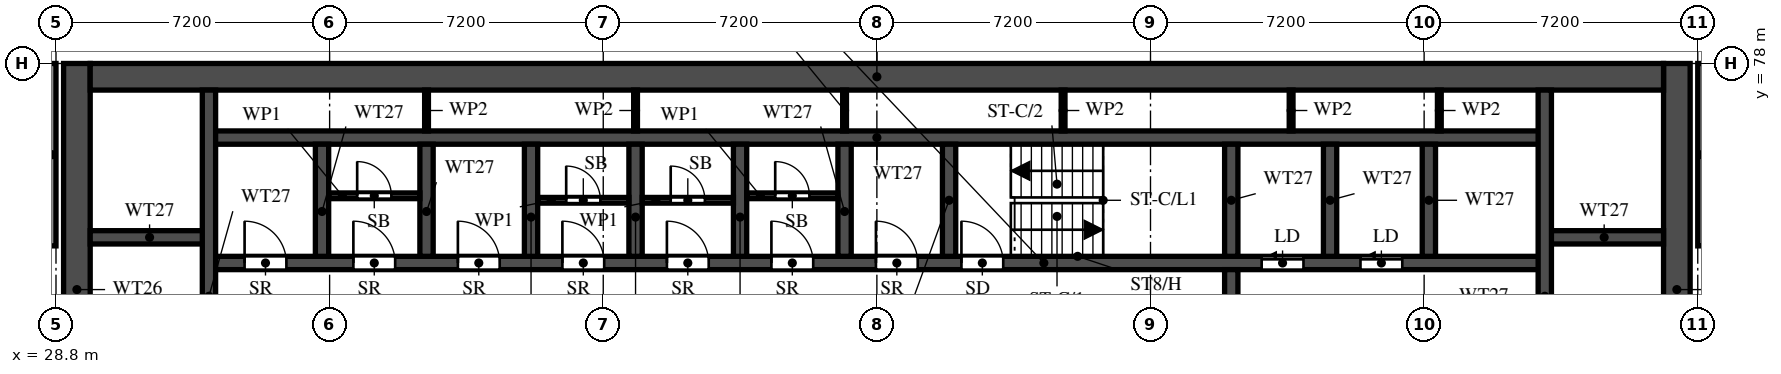
"""IFC4 building model, lengths in metres.
Left out: names, types, materials, properties, quantities, classifications, styles, units other than length and angle.
Written with IfcOpenShell. Run it as: python <this file> out.ifc"""

import sys

from ifc_helpers import new_model, si_unit, direction, frame, frame_2d, origin, place, context, subcontext, project, spatial, rectangle, extrude, element, fill, save


model = new_model("IFC4")
c1 = context("Model", 3, precision=1e-05, world=origin(), true_north=direction((0.0, 1.0)))
c2 = subcontext(c1, "Body", "Model", "MODEL_VIEW")
j1 = project(units=[si_unit("LENGTHUNIT", "METRE"), si_unit("PLANEANGLEUNIT", "RADIAN")], contexts=[c1])
p1 = place(None, origin())
s1 = spatial("IfcSite", under=j1, at=p1, CompositionType="ELEMENT")
p2 = place(p1, origin())
s2 = spatial("IfcBuilding", under=s1, at=p2, CompositionType="ELEMENT")
p3 = place(p2, frame((0.0, 0.0, 120.0)))
s3 = spatial("IfcBuildingStorey", under=s2, at=p3, CompositionType="ELEMENT", Elevation=120.0)
for number, where, z_axis, x_axis in (
    (1, (29.35, 66.1, 0.0), (0.0, 0.0, 1.0), (0.0, 1.0, 0.0)),
    (2, (71.45, 66.1, 0.0), (0.0, 0.0, 1.0), (0.0, 1.0, 0.0)),
):
    element("IfcWall", number, at=place(p3, frame(where, z_axis=z_axis, x_axis=x_axis)), inside=s3, PredefinedType="SHEAR", context=c2, shape_type="SweptSolid", body=[
        extrude(rectangle(XDim=11.9, YDim=0.7, at=frame_2d((5.95, 0.0))), origin(), (0.0, 0.0, 1.0), 3.2),
    ])
p4 = place(p3, frame((29.7, 77.65, 0.0), z_axis=(0.0, 0.0, 1.0), x_axis=(1.0, 0.0, 0.0)))
e3 = element("IfcWall", 3, at=p4, inside=s3, PredefinedType="SHEAR", context=c2, shape_type="SweptSolid", body=[
    extrude(rectangle(XDim=41.4, YDim=0.7, at=frame_2d((20.7, 0.0))), origin(), (0.0, 0.0, 1.0), 3.2),
])
p5 = place(p3, frame((32.825, 72.75, 0.0), z_axis=(0.0, 0.0, 1.0), x_axis=(1.0, 0.0, 0.0)))
e4 = element("IfcWall", 4, at=p5, inside=s3, PredefinedType="SHEAR", context=c2, shape_type="SweptSolid", body=[
    extrude(rectangle(XDim=35.15, YDim=0.35, at=frame_2d((17.575, 0.0))), origin(), (0.0, 0.0, 1.0), 3.2),
])
p6 = place(p5, frame((19.8, 0.0, 0.0)))
e5 = element("IfcOpeningElement", 5, at=p6, cuts=e4, PredefinedType="OPENING", context=c2, shape_type="SweptSolid", body=[
    extrude(rectangle(XDim=1.1, YDim=2.1, at=frame_2d((0.55, 1.05))), frame((0.0, 0.185, 0.0), z_axis=(0.0, -1.0, 0.0), x_axis=(1.0, 0.0, 0.0)), (0.0, 0.0, 1.0), 0.37),
])
p7 = place(p5, frame((27.7, 0.0, 0.0)))
e6 = element("IfcOpeningElement", 6, at=p7, cuts=e4, PredefinedType="OPENING", context=c2, shape_type="SweptSolid", body=[
    extrude(rectangle(XDim=1.1, YDim=2.1, at=frame_2d((0.55, 1.05))), frame((0.0, 0.185, 0.0), z_axis=(0.0, -1.0, 0.0), x_axis=(1.0, 0.0, 0.0)), (0.0, 0.0, 1.0), 0.37),
])
p8 = place(p5, frame((30.3, 0.0, 0.0)))
e7 = element("IfcOpeningElement", 7, at=p8, cuts=e4, PredefinedType="OPENING", context=c2, shape_type="SweptSolid", body=[
    extrude(rectangle(XDim=1.1, YDim=2.1, at=frame_2d((0.55, 1.05))), frame((0.0, 0.185, 0.0), z_axis=(0.0, -1.0, 0.0), x_axis=(1.0, 0.0, 0.0)), (0.0, 0.0, 1.0), 0.37),
])
p9 = place(p5, frame((3.8, 0.0, 0.0)))
e8 = element("IfcOpeningElement", 8, at=p9, cuts=e4, PredefinedType="OPENING", context=c2, shape_type="SweptSolid", body=[
    extrude(rectangle(XDim=1.1, YDim=2.1, at=frame_2d((0.55, 1.05))), frame((0.0, 0.185, 0.0), z_axis=(0.0, -1.0, 0.0), x_axis=(1.0, 0.0, 0.0)), (0.0, 0.0, 1.0), 0.37),
])
p10 = place(p5, frame((6.55, 0.0, 0.0)))
e9 = element("IfcOpeningElement", 9, at=p10, cuts=e4, PredefinedType="OPENING", context=c2, shape_type="SweptSolid", body=[
    extrude(rectangle(XDim=1.1, YDim=2.1, at=frame_2d((0.55, 1.05))), frame((0.0, 0.185, 0.0), z_axis=(0.0, -1.0, 0.0), x_axis=(1.0, 0.0, 0.0)), (0.0, 0.0, 1.0), 0.37),
])
p11 = place(p5, frame((9.3, 0.0, 0.0)))
e10 = element("IfcOpeningElement", 10, at=p11, cuts=e4, PredefinedType="OPENING", context=c2, shape_type="SweptSolid", body=[
    extrude(rectangle(XDim=1.1, YDim=2.1, at=frame_2d((0.55, 1.05))), frame((0.0, 0.185, 0.0), z_axis=(0.0, -1.0, 0.0), x_axis=(1.0, 0.0, 0.0)), (0.0, 0.0, 1.0), 0.37),
])
p12 = place(p5, frame((12.05, 0.0, 0.0)))
e11 = element("IfcOpeningElement", 11, at=p12, cuts=e4, PredefinedType="OPENING", context=c2, shape_type="SweptSolid", body=[
    extrude(rectangle(XDim=1.1, YDim=2.1, at=frame_2d((0.55, 1.05))), frame((0.0, 0.185, 0.0), z_axis=(0.0, -1.0, 0.0), x_axis=(1.0, 0.0, 0.0)), (0.0, 0.0, 1.0), 0.37),
])
p13 = place(p5, frame((14.8, 0.0, 0.0)))
e12 = element("IfcOpeningElement", 12, at=p13, cuts=e4, PredefinedType="OPENING", context=c2, shape_type="SweptSolid", body=[
    extrude(rectangle(XDim=1.1, YDim=2.1, at=frame_2d((0.55, 1.05))), frame((0.0, 0.185, 0.0), z_axis=(0.0, -1.0, 0.0), x_axis=(1.0, 0.0, 0.0)), (0.0, 0.0, 1.0), 0.37),
])
p14 = place(p5, frame((17.55, 0.0, 0.0)))
e13 = element("IfcOpeningElement", 13, at=p14, cuts=e4, PredefinedType="OPENING", context=c2, shape_type="SweptSolid", body=[
    extrude(rectangle(XDim=1.1, YDim=2.1, at=frame_2d((0.55, 1.05))), frame((0.0, 0.185, 0.0), z_axis=(0.0, -1.0, 0.0), x_axis=(1.0, 0.0, 0.0)), (0.0, 0.0, 1.0), 0.37),
])
p15 = place(p5, frame((0.938, 0.0, 0.0)))
e14 = element("IfcOpeningElement", 14, at=p15, cuts=e4, PredefinedType="OPENING", context=c2, shape_type="SweptSolid", body=[
    extrude(rectangle(XDim=1.1, YDim=2.1, at=frame_2d((0.55, 1.05))), frame((0.0, 0.185, 0.0), z_axis=(0.0, -1.0, 0.0), x_axis=(1.0, 0.0, 0.0)), (0.0, 0.0, 1.0), 0.37),
])
p16 = place(p3, frame((32.825, 76.05, 0.0), z_axis=(0.0, 0.0, 1.0), x_axis=(1.0, 0.0, 0.0)))
e15 = element("IfcWall", 15, at=p16, inside=s3, PredefinedType="SHEAR", context=c2, shape_type="SweptSolid", body=[
    extrude(rectangle(XDim=35.15, YDim=0.35, at=frame_2d((17.575, 0.0))), origin(), (0.0, 0.0, 1.0), 3.2),
])
for number, where, z_axis, x_axis in (
    (16, (29.7, 73.425, 0.0), (0.0, 0.0, 1.0), (1.0, 0.0, 0.0)),
    (17, (67.975, 73.425, 0.0), (0.0, 0.0, 1.0), (1.0, 0.0, 0.0)),
):
    element("IfcWall", number, at=place(p3, frame(where, z_axis=z_axis, x_axis=x_axis)), inside=s3, PredefinedType="SHEAR", context=c2, shape_type="SweptSolid", body=[
        extrude(rectangle(XDim=3.125, YDim=0.35, at=frame_2d((1.562, 0.0))), origin(), (0.0, 0.0, 1.0), 3.2),
    ])
p17 = place(p3, frame((32.825, 66.45, 0.0), z_axis=(0.0, 0.0, 1.0), x_axis=(0.0, 1.0, 0.0)))
e18 = element("IfcWall", 18, at=p17, inside=s3, PredefinedType="SHEAR", context=c2, shape_type="SweptSolid", body=[
    extrude(rectangle(XDim=10.85, YDim=0.35, at=frame_2d((5.425, 0.0))), origin(), (0.0, 0.0, 1.0), 3.2),
])
p18 = place(p3, frame((67.975, 66.45, 0.0), z_axis=(0.0, 0.0, 1.0), x_axis=(0.0, 1.0, 0.0)))
e19 = element("IfcWall", 19, at=p18, inside=s3, PredefinedType="SHEAR", context=c2, shape_type="SweptSolid", body=[
    extrude(rectangle(XDim=10.85, YDim=0.35, at=frame_2d((5.425, 0.0))), origin(), (0.0, 0.0, 1.0), 3.2),
])
p19 = place(p18, frame((0.15, 0.0, 0.0)))
e20 = element("IfcOpeningElement", 20, at=p19, cuts=e19, PredefinedType="OPENING", context=c2, shape_type="SweptSolid", body=[
    extrude(rectangle(XDim=1.1, YDim=2.1, at=frame_2d((0.55, 1.05))), frame((0.0, 0.185, 0.0), z_axis=(0.0, -1.0, 0.0), x_axis=(1.0, 0.0, 0.0)), (0.0, 0.0, 1.0), 0.37),
])
p20 = place(p3, frame((59.725, 66.45, 0.0), z_axis=(0.0, 0.0, 1.0), x_axis=(0.0, 1.0, 0.0)))
e21 = element("IfcWall", 21, at=p20, inside=s3, PredefinedType="SHEAR", context=c2, shape_type="SweptSolid", body=[
    extrude(rectangle(XDim=6.125, YDim=0.35, at=frame_2d((3.062, 0.0))), origin(), (0.0, 0.0, 1.0), 3.2),
])
p21 = place(p20, frame((3.85, 0.0, 0.0)))
e22 = element("IfcOpeningElement", 22, at=p21, cuts=e21, PredefinedType="OPENING", context=c2, shape_type="SweptSolid", body=[
    extrude(rectangle(XDim=1.2, YDim=2.1, at=frame_2d((0.6, 1.05))), frame((0.0, 0.185, 0.0), z_axis=(0.0, -1.0, 0.0), x_axis=(1.0, 0.0, 0.0)), (0.0, 0.0, 1.0), 0.37),
])
for number, where, z_axis, x_axis in (
    (23, (59.725, 72.925, 0.0), (0.0, 0.0, 1.0), (0.0, 1.0, 0.0)),
    (24, (35.8, 72.925, 0.0), (0.0, 0.0, 1.0), (0.0, 1.0, 0.0)),
    (25, (38.55, 72.925, 0.0), (0.0, 0.0, 1.0), (0.0, 1.0, 0.0)),
    (26, (41.3, 72.925, 0.0), (0.0, 0.0, 1.0), (0.0, 1.0, 0.0)),
    (27, (44.05, 72.925, 0.0), (0.0, 0.0, 1.0), (0.0, 1.0, 0.0)),
    (28, (46.8, 72.925, 0.0), (0.0, 0.0, 1.0), (0.0, 1.0, 0.0)),
    (29, (49.55, 72.925, 0.0), (0.0, 0.0, 1.0), (0.0, 1.0, 0.0)),
    (30, (52.3, 72.925, 0.0), (0.0, 0.0, 1.0), (0.0, 1.0, 0.0)),
    (31, (62.325, 72.925, 0.0), (0.0, 0.0, 1.0), (0.0, 1.0, 0.0)),
    (32, (64.925, 72.925, 0.0), (0.0, 0.0, 1.0), (0.0, 1.0, 0.0)),
):
    element("IfcWall", number, at=place(p3, frame(where, z_axis=z_axis, x_axis=x_axis)), inside=s3, PredefinedType="SHEAR", context=c2, shape_type="SweptSolid", body=[
        extrude(rectangle(XDim=2.95, YDim=0.35, at=frame_2d((1.475, 0.0))), origin(), (0.0, 0.0, 1.0), 3.2),
    ])
p22 = place(p3, frame((35.975, 74.518, 0.0), z_axis=(0.0, 0.0, 1.0), x_axis=(1.0, 0.0, 0.0)))
e33 = element("IfcWall", 33, at=p22, inside=s3, PredefinedType="PARTITIONING", context=c2, shape_type="SweptSolid", body=[
    extrude(rectangle(XDim=2.4, YDim=0.15, at=frame_2d((1.2, 0.0))), origin(), (0.0, 0.0, 1.0), 3.2),
])
p23 = place(p22, frame((0.75, 0.0, 0.0)))
e34 = element("IfcOpeningElement", 34, at=p23, cuts=e33, PredefinedType="OPENING", context=c2, shape_type="SweptSolid", body=[
    extrude(rectangle(XDim=0.9, YDim=2.1, at=frame_2d((0.45, 1.05))), frame((0.0, 0.085, 0.0), z_axis=(0.0, -1.0, 0.0), x_axis=(1.0, 0.0, 0.0)), (0.0, 0.0, 1.0), 0.17),
])
p24 = place(p3, frame((41.475, 74.4, 0.0), z_axis=(0.0, 0.0, 1.0), x_axis=(1.0, 0.0, 0.0)))
e35 = element("IfcWall", 35, at=p24, inside=s3, PredefinedType="PARTITIONING", context=c2, shape_type="SweptSolid", body=[
    extrude(rectangle(XDim=2.4, YDim=0.15, at=frame_2d((1.2, 0.0))), origin(), (0.0, 0.0, 1.0), 3.2),
])
p25 = place(p24, frame((0.75, 0.0, 0.0)))
e36 = element("IfcOpeningElement", 36, at=p25, cuts=e35, PredefinedType="OPENING", context=c2, shape_type="SweptSolid", body=[
    extrude(rectangle(XDim=0.9, YDim=2.1, at=frame_2d((0.45, 1.05))), frame((0.0, 0.085, 0.0), z_axis=(0.0, -1.0, 0.0), x_axis=(1.0, 0.0, 0.0)), (0.0, 0.0, 1.0), 0.17),
])
p26 = place(p3, frame((44.225, 74.4, 0.0), z_axis=(0.0, 0.0, 1.0), x_axis=(1.0, 0.0, 0.0)))
e37 = element("IfcWall", 37, at=p26, inside=s3, PredefinedType="PARTITIONING", context=c2, shape_type="SweptSolid", body=[
    extrude(rectangle(XDim=2.4, YDim=0.15, at=frame_2d((1.2, 0.0))), origin(), (0.0, 0.0, 1.0), 3.2),
])
p27 = place(p26, frame((0.75, 0.0, 0.0)))
e38 = element("IfcOpeningElement", 38, at=p27, cuts=e37, PredefinedType="OPENING", context=c2, shape_type="SweptSolid", body=[
    extrude(rectangle(XDim=0.9, YDim=2.1, at=frame_2d((0.45, 1.05))), frame((0.0, 0.085, 0.0), z_axis=(0.0, -1.0, 0.0), x_axis=(1.0, 0.0, 0.0)), (0.0, 0.0, 1.0), 0.17),
])
p28 = place(p3, frame((46.975, 74.518, 0.0), z_axis=(0.0, 0.0, 1.0), x_axis=(1.0, 0.0, 0.0)))
e39 = element("IfcWall", 39, at=p28, inside=s3, PredefinedType="PARTITIONING", context=c2, shape_type="SweptSolid", body=[
    extrude(rectangle(XDim=2.4, YDim=0.15, at=frame_2d((1.2, 0.0))), origin(), (0.0, 0.0, 1.0), 3.2),
])
p29 = place(p28, frame((0.75, 0.0, 0.0)))
e40 = element("IfcOpeningElement", 40, at=p29, cuts=e39, PredefinedType="OPENING", context=c2, shape_type="SweptSolid", body=[
    extrude(rectangle(XDim=0.9, YDim=2.1, at=frame_2d((0.45, 1.05))), frame((0.0, 0.085, 0.0), z_axis=(0.0, -1.0, 0.0), x_axis=(1.0, 0.0, 0.0)), (0.0, 0.0, 1.0), 0.17),
])
for number, where, z_axis, x_axis in (
    (41, (38.55, 76.225, 0.0), (0.0, 0.0, 1.0), (0.0, 1.0, 0.0)),
    (42, (44.05, 76.225, 0.0), (0.0, 0.0, 1.0), (0.0, 1.0, 0.0)),
    (43, (49.55, 76.225, 0.0), (0.0, 0.0, 1.0), (0.0, 1.0, 0.0)),
    (44, (55.3, 76.225, 0.0), (0.0, 0.0, 1.0), (0.0, 1.0, 0.0)),
    (45, (61.3, 76.225, 0.0), (0.0, 0.0, 1.0), (0.0, 1.0, 0.0)),
    (46, (65.2, 76.225, 0.0), (0.0, 0.0, 1.0), (0.0, 1.0, 0.0)),
):
    element("IfcWall", number, at=place(p3, frame(where, z_axis=z_axis, x_axis=x_axis)), inside=s3, PredefinedType="PARTITIONING", context=c2, shape_type="SweptSolid", body=[
        extrude(rectangle(XDim=1.075, YDim=0.1, at=frame_2d((0.538, 0.0))), origin(), (0.0, 0.0, 1.0), 3.2),
    ])
for number, where, z_axis, x_axis in (
    (47, (28.7, 73.2, 0.0), (0.0, 0.0, 1.0), (0.0, 1.0, 0.0)),
    (48, (72.1, 73.2, 0.0), (0.0, 0.0, 1.0), (0.0, 1.0, 0.0)),
):
    element("IfcWall", number, at=place(p3, frame(where, z_axis=z_axis, x_axis=x_axis)), inside=s3, PredefinedType="SOLIDWALL", context=c2, shape_type="SweptSolid", body=[
        extrude(rectangle(XDim=4.8, YDim=0.2, at=frame_2d((2.4, 0.0))), origin(), (0.0, 0.0, 1.0), 3.2),
    ])
p30 = place(p6, origin())
e49 = element("IfcDoor", 49, at=p30, inside=s3, OperationType="SINGLE_SWING_LEFT", PredefinedType="DOOR", context=c2, shape_type="SweptSolid", body=[
    extrude(rectangle(XDim=1.1, YDim=2.1, at=frame_2d((0.55, 1.05))), frame((0.0, 0.025, 0.0), z_axis=(0.0, -1.0, 0.0), x_axis=(1.0, 0.0, 0.0)), (0.0, 0.0, 1.0), 0.05),
])
fill(e5, e49)
p31 = place(p7, origin())
e50 = element("IfcDoor", 50, at=p31, inside=s3, OperationType="SLIDING_TO_LEFT", PredefinedType="DOOR", context=c2, shape_type="SweptSolid", body=[
    extrude(rectangle(XDim=1.1, YDim=2.1, at=frame_2d((0.55, 1.05))), frame((0.0, 0.025, 0.0), z_axis=(0.0, -1.0, 0.0), x_axis=(1.0, 0.0, 0.0)), (0.0, 0.0, 1.0), 0.05),
])
fill(e6, e50)
p32 = place(p8, origin())
e51 = element("IfcDoor", 51, at=p32, inside=s3, OperationType="SLIDING_TO_LEFT", PredefinedType="DOOR", context=c2, shape_type="SweptSolid", body=[
    extrude(rectangle(XDim=1.1, YDim=2.1, at=frame_2d((0.55, 1.05))), frame((0.0, 0.025, 0.0), z_axis=(0.0, -1.0, 0.0), x_axis=(1.0, 0.0, 0.0)), (0.0, 0.0, 1.0), 0.05),
])
fill(e7, e51)
p33 = place(p9, origin())
e52 = element("IfcDoor", 52, at=p33, inside=s3, OperationType="SINGLE_SWING_LEFT", PredefinedType="DOOR", context=c2, shape_type="SweptSolid", body=[
    extrude(rectangle(XDim=1.1, YDim=2.1, at=frame_2d((0.55, 1.05))), frame((0.0, 0.025, 0.0), z_axis=(0.0, -1.0, 0.0), x_axis=(1.0, 0.0, 0.0)), (0.0, 0.0, 1.0), 0.05),
])
fill(e8, e52)
p34 = place(p23, origin())
e53 = element("IfcDoor", 53, at=p34, inside=s3, OperationType="SINGLE_SWING_RIGHT", PredefinedType="DOOR", context=c2, shape_type="SweptSolid", body=[
    extrude(rectangle(XDim=0.9, YDim=2.1, at=frame_2d((0.45, 1.05))), frame((0.0, 0.025, 0.0), z_axis=(0.0, -1.0, 0.0), x_axis=(1.0, 0.0, 0.0)), (0.0, 0.0, 1.0), 0.05),
])
fill(e34, e53)
p35 = place(p10, origin())
e54 = element("IfcDoor", 54, at=p35, inside=s3, OperationType="SINGLE_SWING_RIGHT", PredefinedType="DOOR", context=c2, shape_type="SweptSolid", body=[
    extrude(rectangle(XDim=1.1, YDim=2.1, at=frame_2d((0.55, 1.05))), frame((0.0, 0.025, 0.0), z_axis=(0.0, -1.0, 0.0), x_axis=(1.0, 0.0, 0.0)), (0.0, 0.0, 1.0), 0.05),
])
fill(e9, e54)
p36 = place(p11, origin())
e55 = element("IfcDoor", 55, at=p36, inside=s3, OperationType="SINGLE_SWING_LEFT", PredefinedType="DOOR", context=c2, shape_type="SweptSolid", body=[
    extrude(rectangle(XDim=1.1, YDim=2.1, at=frame_2d((0.55, 1.05))), frame((0.0, 0.025, 0.0), z_axis=(0.0, -1.0, 0.0), x_axis=(1.0, 0.0, 0.0)), (0.0, 0.0, 1.0), 0.05),
])
fill(e10, e55)
p37 = place(p25, origin())
e56 = element("IfcDoor", 56, at=p37, inside=s3, OperationType="SINGLE_SWING_LEFT", PredefinedType="DOOR", context=c2, shape_type="SweptSolid", body=[
    extrude(rectangle(XDim=0.9, YDim=2.1, at=frame_2d((0.45, 1.05))), frame((0.0, 0.025, 0.0), z_axis=(0.0, -1.0, 0.0), x_axis=(1.0, 0.0, 0.0)), (0.0, 0.0, 1.0), 0.05),
])
fill(e36, e56)
p38 = place(p12, origin())
e57 = element("IfcDoor", 57, at=p38, inside=s3, OperationType="SINGLE_SWING_RIGHT", PredefinedType="DOOR", context=c2, shape_type="SweptSolid", body=[
    extrude(rectangle(XDim=1.1, YDim=2.1, at=frame_2d((0.55, 1.05))), frame((0.0, 0.025, 0.0), z_axis=(0.0, -1.0, 0.0), x_axis=(1.0, 0.0, 0.0)), (0.0, 0.0, 1.0), 0.05),
])
fill(e11, e57)
p39 = place(p27, origin())
e58 = element("IfcDoor", 58, at=p39, inside=s3, OperationType="SINGLE_SWING_RIGHT", PredefinedType="DOOR", context=c2, shape_type="SweptSolid", body=[
    extrude(rectangle(XDim=0.9, YDim=2.1, at=frame_2d((0.45, 1.05))), frame((0.0, 0.025, 0.0), z_axis=(0.0, -1.0, 0.0), x_axis=(1.0, 0.0, 0.0)), (0.0, 0.0, 1.0), 0.05),
])
fill(e38, e58)
p40 = place(p13, origin())
e59 = element("IfcDoor", 59, at=p40, inside=s3, OperationType="SINGLE_SWING_LEFT", PredefinedType="DOOR", context=c2, shape_type="SweptSolid", body=[
    extrude(rectangle(XDim=1.1, YDim=2.1, at=frame_2d((0.55, 1.05))), frame((0.0, 0.025, 0.0), z_axis=(0.0, -1.0, 0.0), x_axis=(1.0, 0.0, 0.0)), (0.0, 0.0, 1.0), 0.05),
])
fill(e12, e59)
p41 = place(p29, origin())
e60 = element("IfcDoor", 60, at=p41, inside=s3, OperationType="SINGLE_SWING_RIGHT", PredefinedType="DOOR", context=c2, shape_type="SweptSolid", body=[
    extrude(rectangle(XDim=0.9, YDim=2.1, at=frame_2d((0.45, 1.05))), frame((0.0, 0.025, 0.0), z_axis=(0.0, -1.0, 0.0), x_axis=(1.0, 0.0, 0.0)), (0.0, 0.0, 1.0), 0.05),
])
fill(e40, e60)
p42 = place(p14, origin())
e61 = element("IfcDoor", 61, at=p42, inside=s3, OperationType="SINGLE_SWING_RIGHT", PredefinedType="DOOR", context=c2, shape_type="SweptSolid", body=[
    extrude(rectangle(XDim=1.1, YDim=2.1, at=frame_2d((0.55, 1.05))), frame((0.0, 0.025, 0.0), z_axis=(0.0, -1.0, 0.0), x_axis=(1.0, 0.0, 0.0)), (0.0, 0.0, 1.0), 0.05),
])
fill(e13, e61)
p43 = place(p15, origin())
e62 = element("IfcDoor", 62, at=p43, inside=s3, OperationType="SINGLE_SWING_LEFT", PredefinedType="DOOR", context=c2, shape_type="SweptSolid", body=[
    extrude(rectangle(XDim=1.1, YDim=2.1, at=frame_2d((0.55, 1.05))), frame((0.0, 0.025, 0.0), z_axis=(0.0, -1.0, 0.0), x_axis=(1.0, 0.0, 0.0)), (0.0, 0.0, 1.0), 0.05),
])
fill(e14, e62)
save(model, sys.argv[1])
